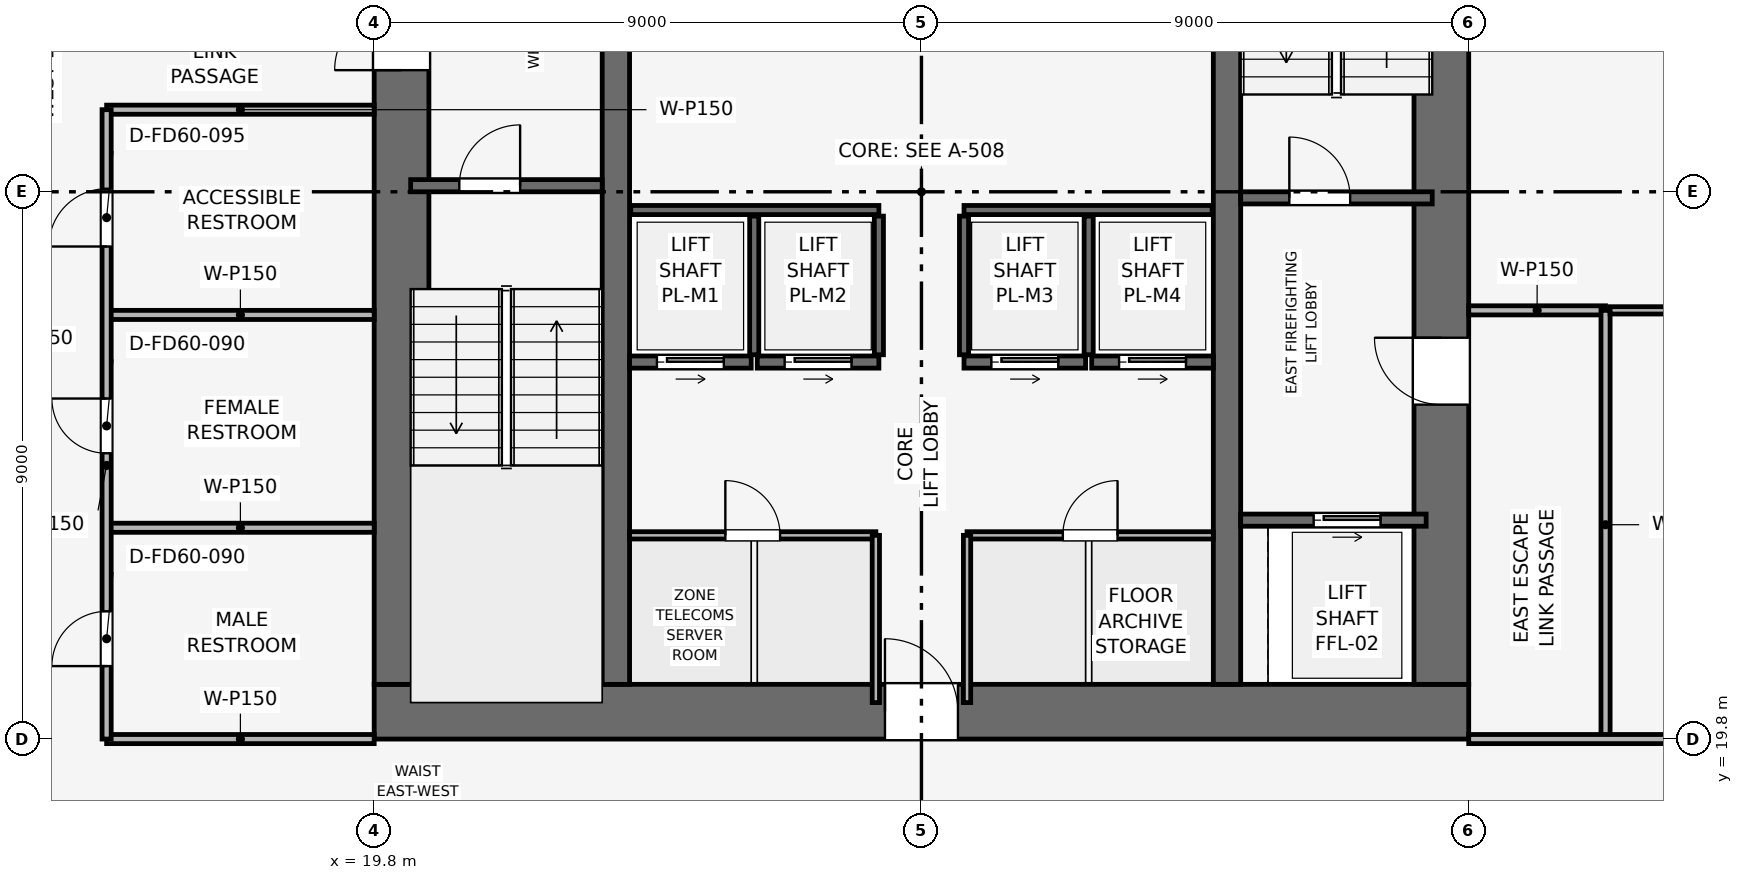
"""IFC4 building model, lengths in metres.
Left out: names, types, materials, properties, quantities, classifications, styles, units other than length and angle.
Written with IfcOpenShell. Run it as: python <this file> out.ifc"""

import sys

from ifc_helpers import new_model, si_unit, direction, frame, frame_2d, origin, place, context, subcontext, project, spatial, rectangle, extrude, element, fill, save


model = new_model("IFC4")
c1 = context("Model", 3, precision=1e-05, world=origin(), true_north=direction((0.0, 1.0)))
c2 = subcontext(c1, "Body", "Model", "MODEL_VIEW")
j1 = project(units=[si_unit("LENGTHUNIT", "METRE"), si_unit("PLANEANGLEUNIT", "RADIAN")], contexts=[c1])
p1 = place(None, origin())
s1 = spatial("IfcSite", under=j1, at=p1, CompositionType="ELEMENT")
p2 = place(p1, origin())
s2 = spatial("IfcBuilding", under=s1, at=p2, CompositionType="ELEMENT")
p3 = place(p2, frame((0.0, 0.0, 175.8)))
s3 = spatial("IfcBuildingStorey", under=s2, at=p3, CompositionType="ELEMENT", Elevation=175.8)
p4 = place(p3, frame((19.8, 20.25, 0.0), z_axis=(0.0, 0.0, 1.0), x_axis=(1.0, 0.0, 0.0)))
e1 = element("IfcWall", 1, at=p4, inside=s3, PredefinedType="SHEAR", context=c2, shape_type="SweptSolid", body=[
    extrude(rectangle(XDim=18.0, YDim=0.9, at=frame_2d((9.0, 0.0))), origin(), (0.0, 0.0, 1.0), 3.75),
])
p5 = place(p4, frame((8.4, 0.0, 0.0)))
e2 = element("IfcOpeningElement", 2, at=p5, cuts=e1, PredefinedType="OPENING", context=c2, shape_type="SweptSolid", body=[
    extrude(rectangle(XDim=1.2, YDim=2.2, at=frame_2d((0.6, 1.1))), frame((0.0, 0.46, 0.0), z_axis=(0.0, -1.0, 0.0), x_axis=(1.0, 0.0, 0.0)), (0.0, 0.0, 1.0), 0.92),
])
p6 = place(p3, frame((20.25, 20.7, 0.0), z_axis=(0.0, 0.0, 1.0), x_axis=(0.0, 1.0, 0.0)))
e3 = element("IfcWall", 3, at=p6, inside=s3, PredefinedType="SHEAR", context=c2, shape_type="SweptSolid", body=[
    extrude(rectangle(XDim=16.2, YDim=0.9, at=frame_2d((8.1, 0.0))), origin(), (0.0, 0.0, 1.0), 3.75),
])
p7 = place(p6, frame((10.1, 0.0, 0.0)))
e4 = element("IfcOpeningElement", 4, at=p7, cuts=e3, PredefinedType="OPENING", context=c2, shape_type="SweptSolid", body=[
    extrude(rectangle(XDim=1.1, YDim=2.15, at=frame_2d((0.55, 1.075))), frame((0.0, 0.46, 0.0), z_axis=(0.0, -1.0, 0.0), x_axis=(1.0, 0.0, 0.0)), (0.0, 0.0, 1.0), 0.92),
])
p8 = place(p3, frame((37.35, 20.7, 0.0), z_axis=(0.0, 0.0, 1.0), x_axis=(0.0, 1.0, 0.0)))
e5 = element("IfcWall", 5, at=p8, inside=s3, PredefinedType="SHEAR", context=c2, shape_type="SweptSolid", body=[
    extrude(rectangle(XDim=16.2, YDim=0.9, at=frame_2d((8.1, 0.0))), origin(), (0.0, 0.0, 1.0), 3.75),
])
p9 = place(p8, frame((4.6, 0.0, 0.0)))
e6 = element("IfcOpeningElement", 6, at=p9, cuts=e5, PredefinedType="OPENING", context=c2, shape_type="SweptSolid", body=[
    extrude(rectangle(XDim=1.1, YDim=2.15, at=frame_2d((0.55, 1.075))), frame((0.0, 0.46, 0.0), z_axis=(0.0, -1.0, 0.0), x_axis=(1.0, 0.0, 0.0)), (0.0, 0.0, 1.0), 0.92),
])
for number, where, z_axis, x_axis in (
    (7, (23.775, 20.7, 0.0), (0.0, 0.0, 1.0), (0.0, 1.0, 0.0)),
    (8, (33.825, 20.7, 0.0), (0.0, 0.0, 1.0), (0.0, 1.0, 0.0)),
):
    element("IfcWall", number, at=place(p3, frame(where, z_axis=z_axis, x_axis=x_axis)), inside=s3, PredefinedType="SHEAR", context=c2, shape_type="SweptSolid", body=[
        extrude(rectangle(XDim=16.2, YDim=0.45, at=frame_2d((8.1, 0.0))), origin(), (0.0, 0.0, 1.0), 3.75),
    ])
p10 = place(p3, frame((20.4, 28.9, 0.0), z_axis=(0.0, 0.0, 1.0), x_axis=(1.0, 0.0, 0.0)))
e9 = element("IfcWall", 9, at=p10, inside=s3, PredefinedType="SHEAR", context=c2, shape_type="SweptSolid", body=[
    extrude(rectangle(XDim=3.15, YDim=0.2, at=frame_2d((1.575, 0.0))), origin(), (0.0, 0.0, 1.0), 3.495),
])
p11 = place(p10, frame((0.8, 0.0, 0.0)))
e10 = element("IfcOpeningElement", 10, at=p11, cuts=e9, PredefinedType="OPENING", context=c2, shape_type="SweptSolid", body=[
    extrude(rectangle(XDim=1.0, YDim=2.1, at=frame_2d((0.5, 1.05))), frame((0.0, 0.11, 0.0), z_axis=(0.0, -1.0, 0.0), x_axis=(1.0, 0.0, 0.0)), (0.0, 0.0, 1.0), 0.22),
])
p12 = place(p3, frame((34.05, 28.7, 0.0), z_axis=(0.0, 0.0, 1.0), x_axis=(1.0, 0.0, 0.0)))
e11 = element("IfcWall", 11, at=p12, inside=s3, PredefinedType="SHEAR", context=c2, shape_type="SweptSolid", body=[
    extrude(rectangle(XDim=3.15, YDim=0.2, at=frame_2d((1.575, 0.0))), origin(), (0.0, 0.0, 1.0), 3.495),
])
p13 = place(p12, frame((0.8, 0.0, 0.0)))
e12 = element("IfcOpeningElement", 12, at=p13, cuts=e11, PredefinedType="OPENING", context=c2, shape_type="SweptSolid", body=[
    extrude(rectangle(XDim=1.0, YDim=2.1, at=frame_2d((0.5, 1.05))), frame((0.0, 0.11, 0.0), z_axis=(0.0, -1.0, 0.0), x_axis=(1.0, 0.0, 0.0)), (0.0, 0.0, 1.0), 0.22),
])
p14 = place(p3, frame((34.05, 23.4, 0.0), z_axis=(0.0, 0.0, 1.0), x_axis=(1.0, 0.0, 0.0)))
e13 = element("IfcWall", 13, at=p14, inside=s3, PredefinedType="SHEAR", context=c2, shape_type="SweptSolid", body=[
    extrude(rectangle(XDim=3.05, YDim=0.2, at=frame_2d((1.525, 0.0))), origin(), (0.0, 0.0, 1.0), 3.495),
])
p15 = place(p14, frame((1.2, 0.0, 0.0)))
e14 = element("IfcOpeningElement", 14, at=p15, cuts=e13, PredefinedType="OPENING", context=c2, shape_type="SweptSolid", body=[
    extrude(rectangle(XDim=1.1, YDim=2.15, at=frame_2d((0.55, 1.075))), frame((0.0, 0.11, 0.0), z_axis=(0.0, -1.0, 0.0), x_axis=(1.0, 0.0, 0.0)), (0.0, 0.0, 1.0), 0.22),
])
p16 = place(p3, frame((24.0, 26.0, 0.0), z_axis=(0.0, 0.0, 1.0), x_axis=(1.0, 0.0, 0.0)))
e15 = element("IfcWall", 15, at=p16, inside=s3, PredefinedType="SHEAR", context=c2, shape_type="SweptSolid", body=[
    extrude(rectangle(XDim=2.0, YDim=0.2, at=frame_2d((1.0, 0.0))), origin(), (0.0, 0.0, 1.0), 3.495),
])
p17 = place(p16, frame((0.45, 0.0, 0.0)))
e16 = element("IfcOpeningElement", 16, at=p17, cuts=e15, PredefinedType="OPENING", context=c2, shape_type="SweptSolid", body=[
    extrude(rectangle(XDim=1.1, YDim=2.15, at=frame_2d((0.55, 1.075))), frame((0.0, 0.11, 0.0), z_axis=(0.0, -1.0, 0.0), x_axis=(1.0, 0.0, 0.0)), (0.0, 0.0, 1.0), 0.22),
])
p18 = place(p3, frame((26.1, 26.0, 0.0), z_axis=(0.0, 0.0, 1.0), x_axis=(1.0, 0.0, 0.0)))
e17 = element("IfcWall", 17, at=p18, inside=s3, PredefinedType="SHEAR", context=c2, shape_type="SweptSolid", body=[
    extrude(rectangle(XDim=2.0, YDim=0.2, at=frame_2d((1.0, 0.0))), origin(), (0.0, 0.0, 1.0), 3.495),
])
p19 = place(p18, frame((0.45, 0.0, 0.0)))
e18 = element("IfcOpeningElement", 18, at=p19, cuts=e17, PredefinedType="OPENING", context=c2, shape_type="SweptSolid", body=[
    extrude(rectangle(XDim=1.1, YDim=2.15, at=frame_2d((0.55, 1.075))), frame((0.0, 0.11, 0.0), z_axis=(0.0, -1.0, 0.0), x_axis=(1.0, 0.0, 0.0)), (0.0, 0.0, 1.0), 0.22),
])
p20 = place(p3, frame((29.5, 26.0, 0.0), z_axis=(0.0, 0.0, 1.0), x_axis=(1.0, 0.0, 0.0)))
e19 = element("IfcWall", 19, at=p20, inside=s3, PredefinedType="SHEAR", context=c2, shape_type="SweptSolid", body=[
    extrude(rectangle(XDim=2.0, YDim=0.2, at=frame_2d((1.0, 0.0))), origin(), (0.0, 0.0, 1.0), 3.495),
])
p21 = place(p20, frame((0.45, 0.0, 0.0)))
e20 = element("IfcOpeningElement", 20, at=p21, cuts=e19, PredefinedType="OPENING", context=c2, shape_type="SweptSolid", body=[
    extrude(rectangle(XDim=1.1, YDim=2.15, at=frame_2d((0.55, 1.075))), frame((0.0, 0.11, 0.0), z_axis=(0.0, -1.0, 0.0), x_axis=(1.0, 0.0, 0.0)), (0.0, 0.0, 1.0), 0.22),
])
p22 = place(p3, frame((31.6, 26.0, 0.0), z_axis=(0.0, 0.0, 1.0), x_axis=(1.0, 0.0, 0.0)))
e21 = element("IfcWall", 21, at=p22, inside=s3, PredefinedType="SHEAR", context=c2, shape_type="SweptSolid", body=[
    extrude(rectangle(XDim=2.0, YDim=0.2, at=frame_2d((1.0, 0.0))), origin(), (0.0, 0.0, 1.0), 3.495),
])
p23 = place(p22, frame((0.45, 0.0, 0.0)))
e22 = element("IfcOpeningElement", 22, at=p23, cuts=e21, PredefinedType="OPENING", context=c2, shape_type="SweptSolid", body=[
    extrude(rectangle(XDim=1.1, YDim=2.15, at=frame_2d((0.55, 1.075))), frame((0.0, 0.11, 0.0), z_axis=(0.0, -1.0, 0.0), x_axis=(1.0, 0.0, 0.0)), (0.0, 0.0, 1.0), 0.22),
])
for number, where, z_axis, x_axis in (
    (23, (24.02, 28.5, 0.0), (0.0, 0.0, 1.0), (1.0, 0.0, 0.0)),
    (24, (29.5, 28.5, 0.0), (0.0, 0.0, 1.0), (1.0, 0.0, 0.0)),
):
    element("IfcWall", number, at=place(p3, frame(where, z_axis=z_axis, x_axis=x_axis)), inside=s3, PredefinedType="SHEAR", context=c2, shape_type="SweptSolid", body=[
        extrude(rectangle(XDim=4.08, YDim=0.15, at=frame_2d((2.04, 0.0))), origin(), (0.0, 0.0, 1.0), 3.495),
    ])
for number, where, z_axis, x_axis in (
    (25, (26.05, 26.12, 0.0), (0.0, 0.0, 1.0), (0.0, 1.0, 0.0)),
    (26, (28.1, 26.12, 0.0), (0.0, 0.0, 1.0), (0.0, 1.0, 0.0)),
    (27, (29.5, 26.12, 0.0), (0.0, 0.0, 1.0), (0.0, 1.0, 0.0)),
    (28, (31.55, 26.12, 0.0), (0.0, 0.0, 1.0), (0.0, 1.0, 0.0)),
):
    element("IfcWall", number, at=place(p3, frame(where, z_axis=z_axis, x_axis=x_axis)), inside=s3, PredefinedType="SHEAR", context=c2, shape_type="SweptSolid", body=[
        extrude(rectangle(XDim=2.28, YDim=0.15, at=frame_2d((1.14, 0.0))), origin(), (0.0, 0.0, 1.0), 3.495),
    ])
p24 = place(p3, frame((24.0, 23.15, 0.0), z_axis=(0.0, 0.0, 1.0), x_axis=(1.0, 0.0, 0.0)))
e29 = element("IfcWall", 29, at=p24, inside=s3, PredefinedType="PARTITIONING", context=c2, shape_type="SweptSolid", body=[
    extrude(rectangle(XDim=4.05, YDim=0.12, at=frame_2d((2.025, 0.0))), origin(), (0.0, 0.0, 1.0), 3.495),
])
p25 = place(p24, frame((1.575, 0.0, 0.0)))
e30 = element("IfcOpeningElement", 30, at=p25, cuts=e29, PredefinedType="OPENING", context=c2, shape_type="SweptSolid", body=[
    extrude(rectangle(XDim=0.9, YDim=2.1, at=frame_2d((0.45, 1.05))), frame((0.0, 0.07, 0.0), z_axis=(0.0, -1.0, 0.0), x_axis=(1.0, 0.0, 0.0)), (0.0, 0.0, 1.0), 0.14),
])
p26 = place(p3, frame((28.05, 20.4, 0.0), z_axis=(0.0, 0.0, 1.0), x_axis=(0.0, 1.0, 0.0)))
e31 = element("IfcWall", 31, at=p26, inside=s3, PredefinedType="PARTITIONING", context=c2, shape_type="SweptSolid", body=[
    extrude(rectangle(XDim=2.75, YDim=0.12, at=frame_2d((1.375, 0.0))), origin(), (0.0, 0.0, 1.0), 3.495),
])
p27 = place(p3, frame((29.55, 23.15, 0.0), z_axis=(0.0, 0.0, 1.0), x_axis=(1.0, 0.0, 0.0)))
e32 = element("IfcWall", 32, at=p27, inside=s3, PredefinedType="PARTITIONING", context=c2, shape_type="SweptSolid", body=[
    extrude(rectangle(XDim=4.05, YDim=0.12, at=frame_2d((2.025, 0.0))), origin(), (0.0, 0.0, 1.0), 3.495),
])
p28 = place(p27, frame((1.575, 0.0, 0.0)))
e33 = element("IfcOpeningElement", 33, at=p28, cuts=e32, PredefinedType="OPENING", context=c2, shape_type="SweptSolid", body=[
    extrude(rectangle(XDim=0.9, YDim=2.1, at=frame_2d((0.45, 1.05))), frame((0.0, 0.07, 0.0), z_axis=(0.0, -1.0, 0.0), x_axis=(1.0, 0.0, 0.0)), (0.0, 0.0, 1.0), 0.14),
])
p29 = place(p3, frame((29.55, 20.4, 0.0), z_axis=(0.0, 0.0, 1.0), x_axis=(0.0, 1.0, 0.0)))
e34 = element("IfcWall", 34, at=p29, inside=s3, PredefinedType="PARTITIONING", context=c2, shape_type="SweptSolid", body=[
    extrude(rectangle(XDim=2.75, YDim=0.12, at=frame_2d((1.375, 0.0))), origin(), (0.0, 0.0, 1.0), 3.495),
])
p30 = place(p3, frame((15.4, 19.8, 0.0), z_axis=(0.0, 0.0, 1.0), x_axis=(1.0, 0.0, 0.0)))
e35 = element("IfcWall", 35, at=p30, inside=s3, PredefinedType="PARTITIONING", context=c2, shape_type="SweptSolid", body=[
    extrude(rectangle(XDim=4.4, YDim=0.15, at=frame_2d((2.2, 0.0))), origin(), (0.0, 0.0, 1.0), 3.03),
])
for number, where, z_axis, x_axis in (
    (36, (15.4, 23.275, 0.0), (0.0, 0.0, 1.0), (1.0, 0.0, 0.0)),
    (37, (15.4, 26.775, 0.0), (0.0, 0.0, 1.0), (1.0, 0.0, 0.0)),
    (38, (15.4, 30.15, 0.0), (0.0, 0.0, 1.0), (1.0, 0.0, 0.0)),
):
    element("IfcWall", number, at=place(p3, frame(where, z_axis=z_axis, x_axis=x_axis)), inside=s3, PredefinedType="PARTITIONING", context=c2, shape_type="SweptSolid", body=[
        extrude(rectangle(XDim=4.4, YDim=0.15, at=frame_2d((2.2, 0.0))), origin(), (0.0, 0.0, 1.0), 3.495),
    ])
p31 = place(p3, frame((15.4, 19.8, 0.0), z_axis=(0.0, 0.0, 1.0), x_axis=(0.0, 1.0, 0.0)))
e39 = element("IfcWall", 39, at=p31, inside=s3, PredefinedType="PARTITIONING", context=c2, shape_type="SweptSolid", body=[
    extrude(rectangle(XDim=10.35, YDim=0.15, at=frame_2d((5.175, 0.0))), origin(), (0.0, 0.0, 1.0), 3.03),
])
p32 = place(p31, frame((1.2, 0.0, 0.0)))
e40 = element("IfcOpeningElement", 40, at=p32, cuts=e39, PredefinedType="OPENING", context=c2, shape_type="SweptSolid", body=[
    extrude(rectangle(XDim=0.9, YDim=2.1, at=frame_2d((0.45, 1.05))), frame((0.0, 0.085, 0.0), z_axis=(0.0, -1.0, 0.0), x_axis=(1.0, 0.0, 0.0)), (0.0, 0.0, 1.0), 0.17),
])
p33 = place(p31, frame((4.7, 0.0, 0.0)))
e41 = element("IfcOpeningElement", 41, at=p33, cuts=e39, PredefinedType="OPENING", context=c2, shape_type="SweptSolid", body=[
    extrude(rectangle(XDim=0.9, YDim=2.1, at=frame_2d((0.45, 1.05))), frame((0.0, 0.085, 0.0), z_axis=(0.0, -1.0, 0.0), x_axis=(1.0, 0.0, 0.0)), (0.0, 0.0, 1.0), 0.17),
])
p34 = place(p31, frame((8.1, 0.0, 0.0)))
e42 = element("IfcOpeningElement", 42, at=p34, cuts=e39, PredefinedType="OPENING", context=c2, shape_type="SweptSolid", body=[
    extrude(rectangle(XDim=0.95, YDim=2.1, at=frame_2d((0.475, 1.05))), frame((0.0, 0.085, 0.0), z_axis=(0.0, -1.0, 0.0), x_axis=(1.0, 0.0, 0.0)), (0.0, 0.0, 1.0), 0.17),
])
p35 = place(p3, frame((37.8, 26.85, 0.0), z_axis=(0.0, 0.0, 1.0), x_axis=(1.0, 0.0, 0.0)))
e43 = element("IfcWall", 43, at=p35, inside=s3, PredefinedType="PARTITIONING", context=c2, shape_type="SweptSolid", body=[
    extrude(rectangle(XDim=2.25, YDim=0.15, at=frame_2d((1.125, 0.0))), origin(), (0.0, 0.0, 1.0), 3.495),
])
p36 = place(p3, frame((40.05, 19.8, 0.0), z_axis=(0.0, 0.0, 1.0), x_axis=(0.0, 1.0, 0.0)))
e44 = element("IfcWall", 44, at=p36, inside=s3, PredefinedType="PARTITIONING", context=c2, shape_type="SweptSolid", body=[
    extrude(rectangle(XDim=7.05, YDim=0.15, at=frame_2d((3.525, 0.0))), origin(), (0.0, 0.0, 1.0), 3.03),
])
p37 = place(p3, frame((40.125, 26.85, 0.0), z_axis=(0.0, 0.0, 1.0), x_axis=(1.0, 0.0, 0.0)))
e45 = element("IfcWall", 45, at=p37, inside=s3, PredefinedType="PARTITIONING", context=c2, shape_type="SweptSolid", body=[
    extrude(rectangle(XDim=12.845, YDim=0.12, at=frame_2d((6.422, 0.0))), origin(), (0.0, 0.0, 1.0), 2.98),
])
p38 = place(p3, frame((37.8, 19.8, 0.0), z_axis=(0.0, 0.0, 1.0), x_axis=(1.0, 0.0, 0.0)))
e46 = element("IfcWall", 46, at=p38, inside=s3, PredefinedType="PARTITIONING", context=c2, shape_type="SweptSolid", body=[
    extrude(rectangle(XDim=15.17, YDim=0.15, at=frame_2d((7.585, 0.0))), origin(), (0.0, 0.0, 1.0), 2.98),
])
p39 = place(p38, frame((4.4, 0.0, 0.0)))
e47 = element("IfcOpeningElement", 47, at=p39, cuts=e46, PredefinedType="OPENING", context=c2, shape_type="SweptSolid", body=[
    extrude(rectangle(XDim=0.9, YDim=2.1, at=frame_2d((0.45, 1.05))), frame((0.0, 0.085, 0.0), z_axis=(0.0, -1.0, 0.0), x_axis=(1.0, 0.0, 0.0)), (0.0, 0.0, 1.0), 0.17),
])
p40 = place(p11, origin())
e48 = element("IfcDoor", 48, at=p40, inside=s3, OperationType="SINGLE_SWING_RIGHT", PredefinedType="DOOR", context=c2, shape_type="SweptSolid", body=[
    extrude(rectangle(XDim=1.0, YDim=2.1, at=frame_2d((0.5, 1.05))), frame((0.0, 0.025, 0.0), z_axis=(0.0, -1.0, 0.0), x_axis=(1.0, 0.0, 0.0)), (0.0, 0.0, 1.0), 0.05),
])
fill(e10, e48)
p41 = place(p13, origin())
e49 = element("IfcDoor", 49, at=p41, inside=s3, OperationType="SINGLE_SWING_LEFT", PredefinedType="DOOR", context=c2, shape_type="SweptSolid", body=[
    extrude(rectangle(XDim=1.0, YDim=2.1, at=frame_2d((0.5, 1.05))), frame((0.0, 0.025, 0.0), z_axis=(0.0, -1.0, 0.0), x_axis=(1.0, 0.0, 0.0)), (0.0, 0.0, 1.0), 0.05),
])
fill(e12, e49)
p42 = place(p15, origin())
e50 = element("IfcDoor", 50, at=p42, inside=s3, OperationType="SLIDING_TO_RIGHT", PredefinedType="DOOR", context=c2, shape_type="SweptSolid", body=[
    extrude(rectangle(XDim=1.1, YDim=2.15, at=frame_2d((0.55, 1.075))), frame((0.0, 0.025, 0.0), z_axis=(0.0, -1.0, 0.0), x_axis=(1.0, 0.0, 0.0)), (0.0, 0.0, 1.0), 0.05),
])
fill(e14, e50)
p43 = place(p17, origin())
e51 = element("IfcDoor", 51, at=p43, inside=s3, OperationType="SLIDING_TO_RIGHT", PredefinedType="DOOR", context=c2, shape_type="SweptSolid", body=[
    extrude(rectangle(XDim=1.1, YDim=2.15, at=frame_2d((0.55, 1.075))), frame((0.0, 0.025, 0.0), z_axis=(0.0, -1.0, 0.0), x_axis=(1.0, 0.0, 0.0)), (0.0, 0.0, 1.0), 0.05),
])
fill(e16, e51)
p44 = place(p19, origin())
e52 = element("IfcDoor", 52, at=p44, inside=s3, OperationType="SLIDING_TO_RIGHT", PredefinedType="DOOR", context=c2, shape_type="SweptSolid", body=[
    extrude(rectangle(XDim=1.1, YDim=2.15, at=frame_2d((0.55, 1.075))), frame((0.0, 0.025, 0.0), z_axis=(0.0, -1.0, 0.0), x_axis=(1.0, 0.0, 0.0)), (0.0, 0.0, 1.0), 0.05),
])
fill(e18, e52)
p45 = place(p21, origin())
e53 = element("IfcDoor", 53, at=p45, inside=s3, OperationType="SLIDING_TO_RIGHT", PredefinedType="DOOR", context=c2, shape_type="SweptSolid", body=[
    extrude(rectangle(XDim=1.1, YDim=2.15, at=frame_2d((0.55, 1.075))), frame((0.0, 0.025, 0.0), z_axis=(0.0, -1.0, 0.0), x_axis=(1.0, 0.0, 0.0)), (0.0, 0.0, 1.0), 0.05),
])
fill(e20, e53)
p46 = place(p23, origin())
e54 = element("IfcDoor", 54, at=p46, inside=s3, OperationType="SLIDING_TO_RIGHT", PredefinedType="DOOR", context=c2, shape_type="SweptSolid", body=[
    extrude(rectangle(XDim=1.1, YDim=2.15, at=frame_2d((0.55, 1.075))), frame((0.0, 0.025, 0.0), z_axis=(0.0, -1.0, 0.0), x_axis=(1.0, 0.0, 0.0)), (0.0, 0.0, 1.0), 0.05),
])
fill(e22, e54)
p47 = place(p25, origin())
e55 = element("IfcDoor", 55, at=p47, inside=s3, OperationType="SINGLE_SWING_LEFT", PredefinedType="DOOR", context=c2, shape_type="SweptSolid", body=[
    extrude(rectangle(XDim=0.9, YDim=2.1, at=frame_2d((0.45, 1.05))), frame((0.0, 0.025, 0.0), z_axis=(0.0, -1.0, 0.0), x_axis=(1.0, 0.0, 0.0)), (0.0, 0.0, 1.0), 0.05),
])
fill(e30, e55)
p48 = place(p28, origin())
e56 = element("IfcDoor", 56, at=p48, inside=s3, OperationType="SINGLE_SWING_RIGHT", PredefinedType="DOOR", context=c2, shape_type="SweptSolid", body=[
    extrude(rectangle(XDim=0.9, YDim=2.1, at=frame_2d((0.45, 1.05))), frame((0.0, 0.025, 0.0), z_axis=(0.0, -1.0, 0.0), x_axis=(1.0, 0.0, 0.0)), (0.0, 0.0, 1.0), 0.05),
])
fill(e33, e56)
p49 = place(p32, origin())
e57 = element("IfcDoor", 57, at=p49, inside=s3, OperationType="SINGLE_SWING_LEFT", PredefinedType="DOOR", context=c2, shape_type="SweptSolid", body=[
    extrude(rectangle(XDim=0.9, YDim=2.1, at=frame_2d((0.45, 1.05))), frame((0.0, 0.025, 0.0), z_axis=(0.0, -1.0, 0.0), x_axis=(1.0, 0.0, 0.0)), (0.0, 0.0, 1.0), 0.05),
])
fill(e40, e57)
p50 = place(p33, origin())
e58 = element("IfcDoor", 58, at=p50, inside=s3, OperationType="SINGLE_SWING_RIGHT", PredefinedType="DOOR", context=c2, shape_type="SweptSolid", body=[
    extrude(rectangle(XDim=0.9, YDim=2.1, at=frame_2d((0.45, 1.05))), frame((0.0, 0.025, 0.0), z_axis=(0.0, -1.0, 0.0), x_axis=(1.0, 0.0, 0.0)), (0.0, 0.0, 1.0), 0.05),
])
fill(e41, e58)
p51 = place(p34, origin())
e59 = element("IfcDoor", 59, at=p51, inside=s3, OperationType="SINGLE_SWING_LEFT", PredefinedType="DOOR", context=c2, shape_type="SweptSolid", body=[
    extrude(rectangle(XDim=0.95, YDim=2.1, at=frame_2d((0.475, 1.05))), frame((0.0, 0.025, 0.0), z_axis=(0.0, -1.0, 0.0), x_axis=(1.0, 0.0, 0.0)), (0.0, 0.0, 1.0), 0.05),
])
fill(e42, e59)
p52 = place(p7, origin())
e60 = element("IfcDoor", 60, at=p52, inside=s3, OperationType="SINGLE_SWING_LEFT", PredefinedType="DOOR", context=c2, shape_type="SweptSolid", body=[
    extrude(rectangle(XDim=1.1, YDim=2.15, at=frame_2d((0.55, 1.075))), frame((0.0, 0.025, 0.0), z_axis=(0.0, -1.0, 0.0), x_axis=(1.0, 0.0, 0.0)), (0.0, 0.0, 1.0), 0.05),
])
fill(e4, e60)
p53 = place(p9, origin())
e61 = element("IfcDoor", 61, at=p53, inside=s3, OperationType="SINGLE_SWING_RIGHT", PredefinedType="DOOR", context=c2, shape_type="SweptSolid", body=[
    extrude(rectangle(XDim=1.1, YDim=2.15, at=frame_2d((0.55, 1.075))), frame((0.0, 0.025, 0.0), z_axis=(0.0, -1.0, 0.0), x_axis=(1.0, 0.0, 0.0)), (0.0, 0.0, 1.0), 0.05),
])
fill(e6, e61)
p54 = place(p5, origin())
e62 = element("IfcDoor", 62, at=p54, inside=s3, OperationType="SINGLE_SWING_LEFT", PredefinedType="DOOR", context=c2, shape_type="SweptSolid", body=[
    extrude(rectangle(XDim=1.2, YDim=2.2, at=frame_2d((0.6, 1.1))), frame((0.0, 0.025, 0.0), z_axis=(0.0, -1.0, 0.0), x_axis=(1.0, 0.0, 0.0)), (0.0, 0.0, 1.0), 0.05),
])
fill(e2, e62)
save(model, sys.argv[1])
